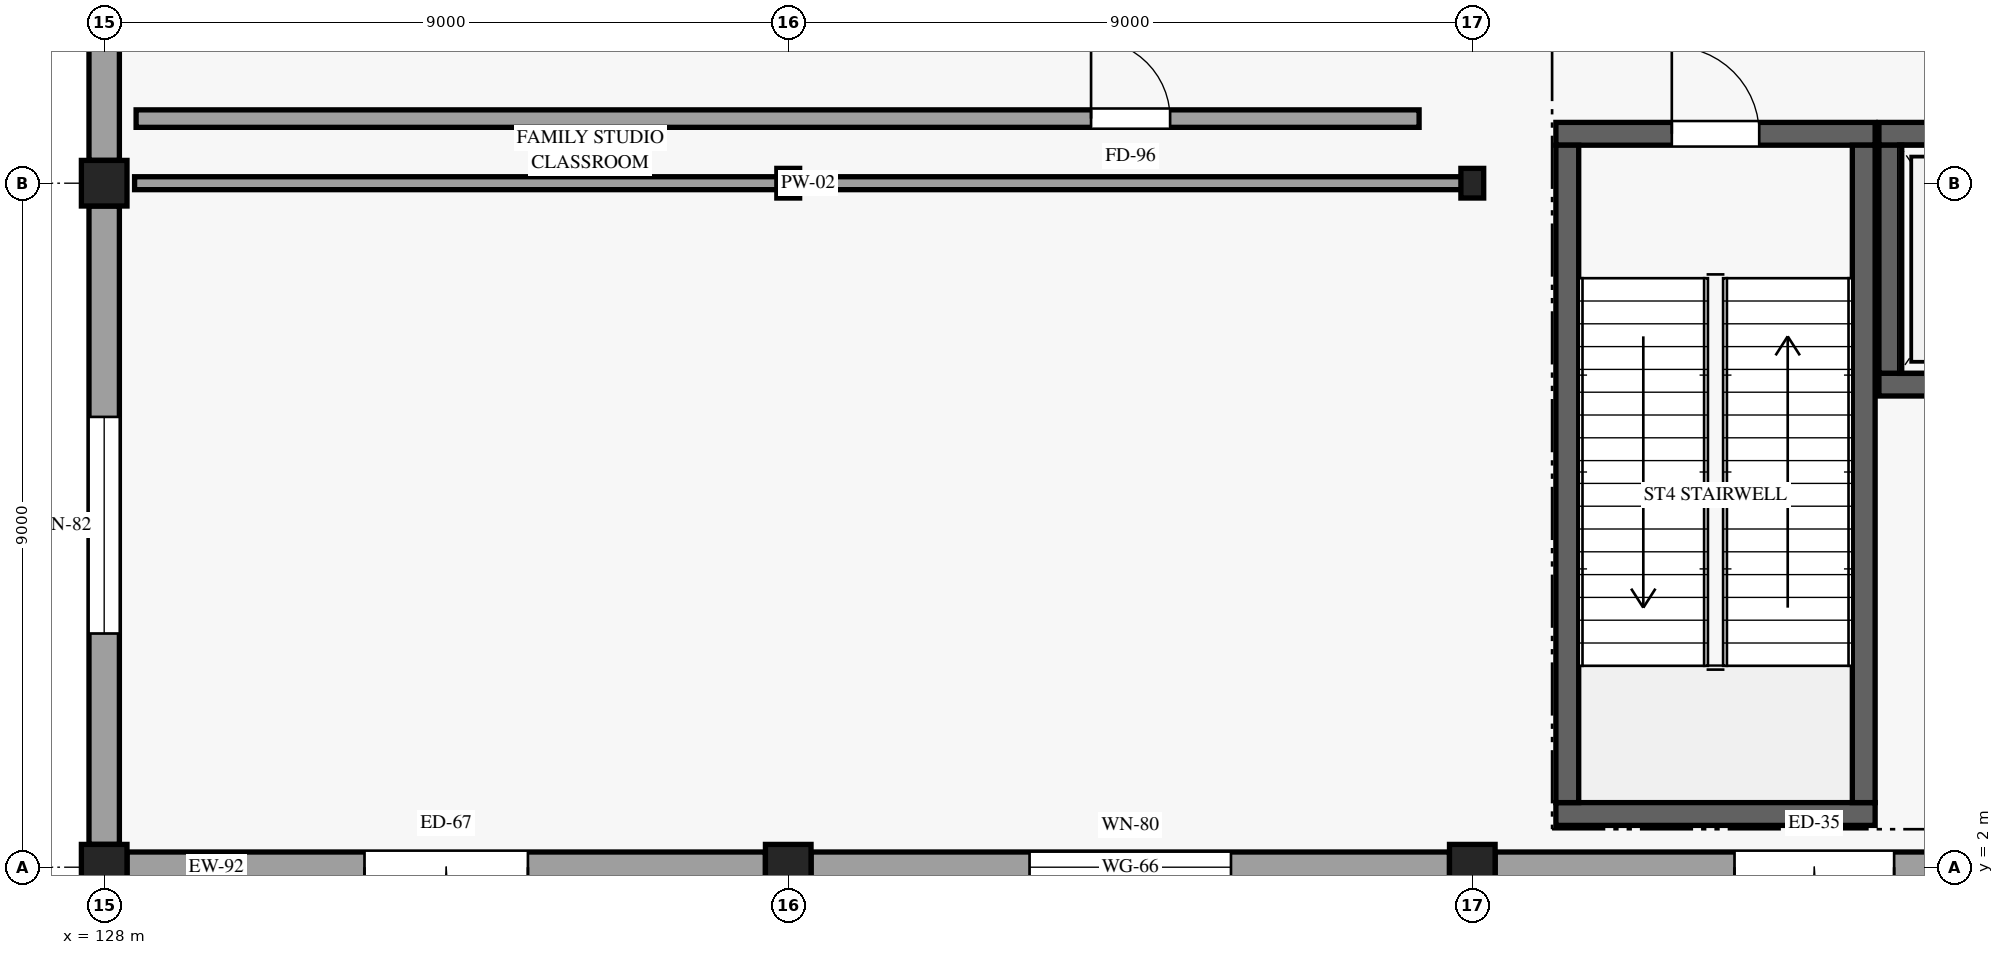
"""IFC4 building model, lengths in metres.
Left out: names, types, materials, properties, quantities, classifications, styles, units other than length and angle.
Written with IfcOpenShell. Run it as: python <this file> out.ifc"""

import sys

from ifc_helpers import new_model, si_unit, direction, frame, frame_2d, origin, origin_2d, place, context, subcontext, project, spatial, rectangle, i_section, extrude, element, fill, save


model = new_model("IFC4")
c1 = context("Model", 3, precision=1e-05, world=origin(), true_north=direction((0.0, 1.0)))
c2 = subcontext(c1, "Body", "Model", "MODEL_VIEW")
j1 = project(units=[si_unit("LENGTHUNIT", "METRE"), si_unit("PLANEANGLEUNIT", "RADIAN")], contexts=[c1])
p1 = place(None, origin())
s1 = spatial("IfcSite", under=j1, at=p1, CompositionType="ELEMENT")
p2 = place(p1, origin())
s2 = spatial("IfcBuilding", under=s1, at=p2, CompositionType="ELEMENT")
p3 = place(p2, origin())
s3 = spatial("IfcBuildingStorey", under=s2, at=p3, CompositionType="ELEMENT", Elevation=0.0)
for number, where, z_axis, x_axis in (
    (1, (128.0, 2.0, 0.0), (0.0, 0.0, 1.0), (1.0, 0.0, 0.0)),
    (2, (128.0, 11.0, 0.0), (0.0, 0.0, 1.0), (1.0, 0.0, 0.0)),
    (3, (137.0, 2.0, 0.0), (0.0, 0.0, 1.0), (1.0, 0.0, 0.0)),
):
    element("IfcColumn", number, at=place(p3, frame(where, z_axis=z_axis, x_axis=x_axis)), inside=s3, PredefinedType="COLUMN", context=c2, shape_type="SweptSolid", body=[
        extrude(rectangle(XDim=0.6, YDim=0.6, at=origin_2d()), origin(), (0.0, 0.0, 1.0), 5.4),
    ])
p4 = place(p3, frame((137.0, 11.0, 0.0), z_axis=(0.0, 0.0, 1.0), x_axis=(1.0, 0.0, 0.0)))
e4 = element("IfcColumn", 4, at=p4, inside=s3, PredefinedType="COLUMN", context=c2, shape_type="SweptSolid", body=[
    extrude(i_section(OverallWidth=0.3, OverallDepth=0.39, WebThickness=0.011, FlangeThickness=0.019, FilletRadius=0.027, at=origin_2d()), origin(), (0.0, 0.0, 1.0), 5.4),
])
p5 = place(p3, frame((146.0, 2.0, 0.0), z_axis=(0.0, 0.0, 1.0), x_axis=(1.0, 0.0, 0.0)))
e5 = element("IfcColumn", 5, at=p5, inside=s3, PredefinedType="COLUMN", context=c2, shape_type="SweptSolid", body=[
    extrude(rectangle(XDim=0.6, YDim=0.6, at=origin_2d()), origin(), (0.0, 0.0, 1.0), 5.4),
])
p6 = place(p3, frame((146.0, 11.0, 0.0), z_axis=(0.0, 0.0, 1.0), x_axis=(1.0, 0.0, 0.0)))
e6 = element("IfcColumn", 6, at=p6, inside=s3, PredefinedType="COLUMN", context=c2, shape_type="SweptSolid", body=[
    extrude(i_section(OverallWidth=0.3, OverallDepth=0.39, WebThickness=0.011, FlangeThickness=0.019, FilletRadius=0.027, at=origin_2d()), origin(), (0.0, 0.0, 1.0), 5.4),
])
p7 = place(p3, frame((128.3, 2.0, 0.0), z_axis=(0.0, 0.0, 1.0), x_axis=(1.0, 0.0, 0.0)))
e7 = element("IfcWall", 7, at=p7, inside=s3, PredefinedType="STANDARD", context=c2, shape_type="SweptSolid", body=[
    extrude(rectangle(XDim=8.4, YDim=0.4, at=frame_2d((4.2, 0.0))), origin(), (0.0, 0.0, 1.0), 4.555),
])
p8 = place(p7, frame((5.275, 0.0, 0.0), z_axis=(0.0, 0.0, 1.0), x_axis=(-1.0, 0.0, 0.0)))
e8 = element("IfcOpeningElement", 8, at=p8, cuts=e7, PredefinedType="OPENING", context=c2, shape_type="SweptSolid", body=[
    extrude(rectangle(XDim=2.15, YDim=2.45, at=frame_2d((1.075, 1.225))), frame((0.0, 0.21, 0.0), z_axis=(0.0, -1.0, 0.0), x_axis=(1.0, 0.0, 0.0)), (0.0, 0.0, 1.0), 0.42),
])
p9 = place(p3, frame((137.3, 2.0, 0.0), z_axis=(0.0, 0.0, 1.0), x_axis=(1.0, 0.0, 0.0)))
e9 = element("IfcWall", 9, at=p9, inside=s3, PredefinedType="STANDARD", context=c2, shape_type="SweptSolid", body=[
    extrude(rectangle(XDim=8.4, YDim=0.4, at=frame_2d((4.2, 0.0))), origin(), (0.0, 0.0, 1.0), 4.555),
])
p10 = place(p9, frame((5.525, 0.0, 0.85), z_axis=(0.0, 0.0, 1.0), x_axis=(-1.0, 0.0, 0.0)))
e10 = element("IfcOpeningElement", 10, at=p10, cuts=e9, PredefinedType="OPENING", context=c2, shape_type="SweptSolid", body=[
    extrude(rectangle(XDim=2.65, YDim=2.45, at=frame_2d((1.325, 1.225))), frame((0.0, 0.21, 0.0), z_axis=(0.0, -1.0, 0.0), x_axis=(1.0, 0.0, 0.0)), (0.0, 0.0, 1.0), 0.42),
])
p11 = place(p3, frame((146.3, 2.0, 0.0), z_axis=(0.0, 0.0, 1.0), x_axis=(1.0, 0.0, 0.0)))
e11 = element("IfcWall", 11, at=p11, inside=s3, PredefinedType="STANDARD", context=c2, shape_type="SweptSolid", body=[
    extrude(rectangle(XDim=8.4, YDim=0.4, at=frame_2d((4.2, 0.0))), origin(), (0.0, 0.0, 1.0), 4.555),
])
p12 = place(p11, frame((5.25, 0.0, 0.0), z_axis=(0.0, 0.0, 1.0), x_axis=(-1.0, 0.0, 0.0)))
e12 = element("IfcOpeningElement", 12, at=p12, cuts=e11, PredefinedType="OPENING", context=c2, shape_type="SweptSolid", body=[
    extrude(rectangle(XDim=2.1, YDim=2.45, at=frame_2d((1.05, 1.225))), frame((0.0, 0.21, 0.0), z_axis=(0.0, -1.0, 0.0), x_axis=(1.0, 0.0, 0.0)), (0.0, 0.0, 1.0), 0.42),
])
p13 = place(p3, frame((128.0, 2.3, 0.0), z_axis=(0.0, 0.0, 1.0), x_axis=(0.0, 1.0, 0.0)))
e13 = element("IfcWall", 13, at=p13, inside=s3, PredefinedType="STANDARD", context=c2, shape_type="SweptSolid", body=[
    extrude(rectangle(XDim=8.4, YDim=0.4, at=frame_2d((4.2, 0.0))), origin(), (0.0, 0.0, 1.0), 4.555),
])
p14 = place(p13, frame((2.775, 0.0, 0.85)))
e14 = element("IfcOpeningElement", 14, at=p14, cuts=e13, PredefinedType="OPENING", context=c2, shape_type="SweptSolid", body=[
    extrude(rectangle(XDim=2.85, YDim=2.5, at=frame_2d((1.425, 1.25))), frame((0.0, 0.21, 0.0), z_axis=(0.0, -1.0, 0.0), x_axis=(1.0, 0.0, 0.0)), (0.0, 0.0, 1.0), 0.42),
])
p15 = place(p3, frame((128.0, 11.3, 0.0), z_axis=(0.0, 0.0, 1.0), x_axis=(0.0, 1.0, 0.0)))
e15 = element("IfcWall", 15, at=p15, inside=s3, PredefinedType="STANDARD", context=c2, shape_type="SweptSolid", body=[
    extrude(rectangle(XDim=8.4, YDim=0.4, at=frame_2d((4.2, 0.0))), origin(), (0.0, 0.0, 1.0), 4.555),
])
p16 = place(p15, frame((2.675, 0.0, 0.85)))
e16 = element("IfcOpeningElement", 16, at=p16, cuts=e15, PredefinedType="OPENING", context=c2, shape_type="SweptSolid", body=[
    extrude(rectangle(XDim=3.05, YDim=2.55, at=frame_2d((1.525, 1.275))), frame((0.0, 0.21, 0.0), z_axis=(0.0, -1.0, 0.0), x_axis=(1.0, 0.0, 0.0)), (0.0, 0.0, 1.0), 0.42),
])
p17 = place(p3, frame((147.1, 11.65, 0.0), z_axis=(0.0, 0.0, 1.0), x_axis=(1.0, 0.0, 0.0)))
e17 = element("IfcWall", 17, at=p17, inside=s3, PredefinedType="SHEAR", context=c2, shape_type="SweptSolid", body=[
    extrude(rectangle(XDim=4.2, YDim=0.3, at=frame_2d((2.1, 0.0))), origin(), (0.0, 0.0, 1.0), 5.16),
])
p18 = place(p17, frame((1.525, 0.0, 0.0)))
e18 = element("IfcOpeningElement", 18, at=p18, cuts=e17, PredefinedType="OPENING", context=c2, shape_type="SweptSolid", body=[
    extrude(rectangle(XDim=1.15, YDim=2.2, at=frame_2d((0.575, 1.1))), frame((0.0, 0.16, 0.0), z_axis=(0.0, -1.0, 0.0), x_axis=(1.0, 0.0, 0.0)), (0.0, 0.0, 1.0), 0.32),
])
p19 = place(p3, frame((147.1, 2.7, 0.0), z_axis=(0.0, 0.0, 1.0), x_axis=(1.0, 0.0, 0.0)))
e19 = element("IfcWall", 19, at=p19, inside=s3, PredefinedType="SHEAR", context=c2, shape_type="SweptSolid", body=[
    extrude(rectangle(XDim=4.2, YDim=0.3, at=frame_2d((2.1, 0.0))), origin(), (0.0, 0.0, 1.0), 5.16),
])
for number, where, z_axis, x_axis in (
    (20, (147.25, 2.85, 0.0), (0.0, 0.0, 1.0), (0.0, 1.0, 0.0)),
    (21, (151.15, 2.85, 0.0), (0.0, 0.0, 1.0), (0.0, 1.0, 0.0)),
):
    element("IfcWall", number, at=place(p3, frame(where, z_axis=z_axis, x_axis=x_axis)), inside=s3, PredefinedType="SHEAR", context=c2, shape_type="SweptSolid", body=[
        extrude(rectangle(XDim=8.65, YDim=0.3, at=frame_2d((4.325, 0.0))), origin(), (0.0, 0.0, 1.0), 5.16),
    ])
p20 = place(p3, frame((151.35, 11.65, 0.0), z_axis=(0.0, 0.0, 1.0), x_axis=(1.0, 0.0, 0.0)))
e22 = element("IfcWall", 22, at=p20, inside=s3, PredefinedType="SHEAR", context=c2, shape_type="SweptSolid", body=[
    extrude(rectangle(XDim=2.6, YDim=0.3, at=frame_2d((1.3, 0.0))), origin(), (0.0, 0.0, 1.0), 5.16),
])
p21 = place(p20, frame((0.75, 0.0, 0.0)))
e23 = element("IfcOpeningElement", 23, at=p21, cuts=e22, PredefinedType="OPENING", context=c2, shape_type="SweptSolid", body=[
    extrude(rectangle(XDim=1.1, YDim=2.2, at=frame_2d((0.55, 1.1))), frame((0.0, 0.16, 0.0), z_axis=(0.0, -1.0, 0.0), x_axis=(1.0, 0.0, 0.0)), (0.0, 0.0, 1.0), 0.32),
])
p22 = place(p3, frame((151.35, 8.35, 0.0), z_axis=(0.0, 0.0, 1.0), x_axis=(1.0, 0.0, 0.0)))
e24 = element("IfcWall", 24, at=p22, inside=s3, PredefinedType="SHEAR", context=c2, shape_type="SweptSolid", body=[
    extrude(rectangle(XDim=2.6, YDim=0.3, at=frame_2d((1.3, 0.0))), origin(), (0.0, 0.0, 1.0), 5.16),
])
p23 = place(p3, frame((151.5, 8.5, 0.0), z_axis=(0.0, 0.0, 1.0), x_axis=(0.0, 1.0, 0.0)))
e25 = element("IfcWall", 25, at=p23, inside=s3, PredefinedType="SHEAR", context=c2, shape_type="SweptSolid", body=[
    extrude(rectangle(XDim=3.0, YDim=0.3, at=frame_2d((1.5, 0.0))), origin(), (0.0, 0.0, 1.0), 5.16),
])
p24 = place(p3, frame((128.4, 11.0, 0.0), z_axis=(0.0, 0.0, 1.0), x_axis=(1.0, 0.0, 0.0)))
e26 = element("IfcWall", 26, at=p24, inside=s3, PredefinedType="PARTITIONING", context=c2, shape_type="SweptSolid", body=[
    extrude(rectangle(XDim=17.72, YDim=0.17, at=frame_2d((8.86, 0.0))), origin(), (0.0, 0.0, 1.0), 4.555),
])
p25 = place(p3, frame((128.42, 11.85, 0.0), z_axis=(0.0, 0.0, 1.0), x_axis=(1.0, 0.0, 0.0)))
e27 = element("IfcWall", 27, at=p25, inside=s3, PredefinedType="PARTITIONING", context=c2, shape_type="SweptSolid", body=[
    extrude(rectangle(XDim=16.88, YDim=0.23, at=frame_2d((8.44, 0.0))), origin(), (0.0, 0.0, 1.0), 4.555),
])
p26 = place(p25, frame((12.564, 0.0, 0.0)))
e28 = element("IfcOpeningElement", 28, at=p26, cuts=e27, PredefinedType="OPENING", context=c2, shape_type="SweptSolid", body=[
    extrude(rectangle(XDim=1.04, YDim=2.22, at=frame_2d((0.52, 1.11))), frame((0.0, 0.125, 0.0), z_axis=(0.0, -1.0, 0.0), x_axis=(1.0, 0.0, 0.0)), (0.0, 0.0, 1.0), 0.25),
])
p27 = place(p8, origin())
e29 = element("IfcDoor", 29, at=p27, inside=s3, OperationType="DOUBLE_DOOR_SINGLE_SWING", PredefinedType="DOOR", context=c2, shape_type="SweptSolid", body=[
    extrude(rectangle(XDim=2.15, YDim=2.45, at=frame_2d((1.075, 1.225))), frame((0.0, 0.025, 0.0), z_axis=(0.0, -1.0, 0.0), x_axis=(1.0, 0.0, 0.0)), (0.0, 0.0, 1.0), 0.05),
])
fill(e8, e29)
p28 = place(p10, origin())
e30 = element("IfcWindow", 30, at=p28, inside=s3, PartitioningType="SINGLE_PANEL", PredefinedType="WINDOW", context=c2, shape_type="SweptSolid", body=[
    extrude(rectangle(XDim=2.65, YDim=2.45, at=frame_2d((1.325, 1.225))), frame((0.0, 0.03, 0.0), z_axis=(0.0, -1.0, 0.0), x_axis=(1.0, 0.0, 0.0)), (0.0, 0.0, 1.0), 0.06),
])
fill(e10, e30)
p29 = place(p12, origin())
e31 = element("IfcDoor", 31, at=p29, inside=s3, OperationType="DOUBLE_DOOR_SINGLE_SWING", PredefinedType="DOOR", context=c2, shape_type="SweptSolid", body=[
    extrude(rectangle(XDim=2.1, YDim=2.45, at=frame_2d((1.05, 1.225))), frame((0.0, 0.025, 0.0), z_axis=(0.0, -1.0, 0.0), x_axis=(1.0, 0.0, 0.0)), (0.0, 0.0, 1.0), 0.05),
])
fill(e12, e31)
p30 = place(p14, origin())
e32 = element("IfcWindow", 32, at=p30, inside=s3, PartitioningType="SINGLE_PANEL", PredefinedType="WINDOW", context=c2, shape_type="SweptSolid", body=[
    extrude(rectangle(XDim=2.85, YDim=2.5, at=frame_2d((1.425, 1.25))), frame((0.0, 0.03, 0.0), z_axis=(0.0, -1.0, 0.0), x_axis=(1.0, 0.0, 0.0)), (0.0, 0.0, 1.0), 0.06),
])
fill(e14, e32)
p31 = place(p18, origin())
e33 = element("IfcDoor", 33, at=p31, inside=s3, OperationType="SINGLE_SWING_LEFT", PredefinedType="DOOR", context=c2, shape_type="SweptSolid", body=[
    extrude(rectangle(XDim=1.15, YDim=2.2, at=frame_2d((0.575, 1.1))), frame((0.0, 0.025, 0.0), z_axis=(0.0, -1.0, 0.0), x_axis=(1.0, 0.0, 0.0)), (0.0, 0.0, 1.0), 0.05),
])
fill(e18, e33)
p32 = place(p26, origin())
e34 = element("IfcDoor", 34, at=p32, inside=s3, OperationType="SINGLE_SWING_LEFT", PredefinedType="DOOR", context=c2, shape_type="SweptSolid", body=[
    extrude(rectangle(XDim=1.04, YDim=2.22, at=frame_2d((0.52, 1.11))), frame((0.0, 0.025, 0.0), z_axis=(0.0, -1.0, 0.0), x_axis=(1.0, 0.0, 0.0)), (0.0, 0.0, 1.0), 0.05),
])
fill(e28, e34)
save(model, sys.argv[1])
